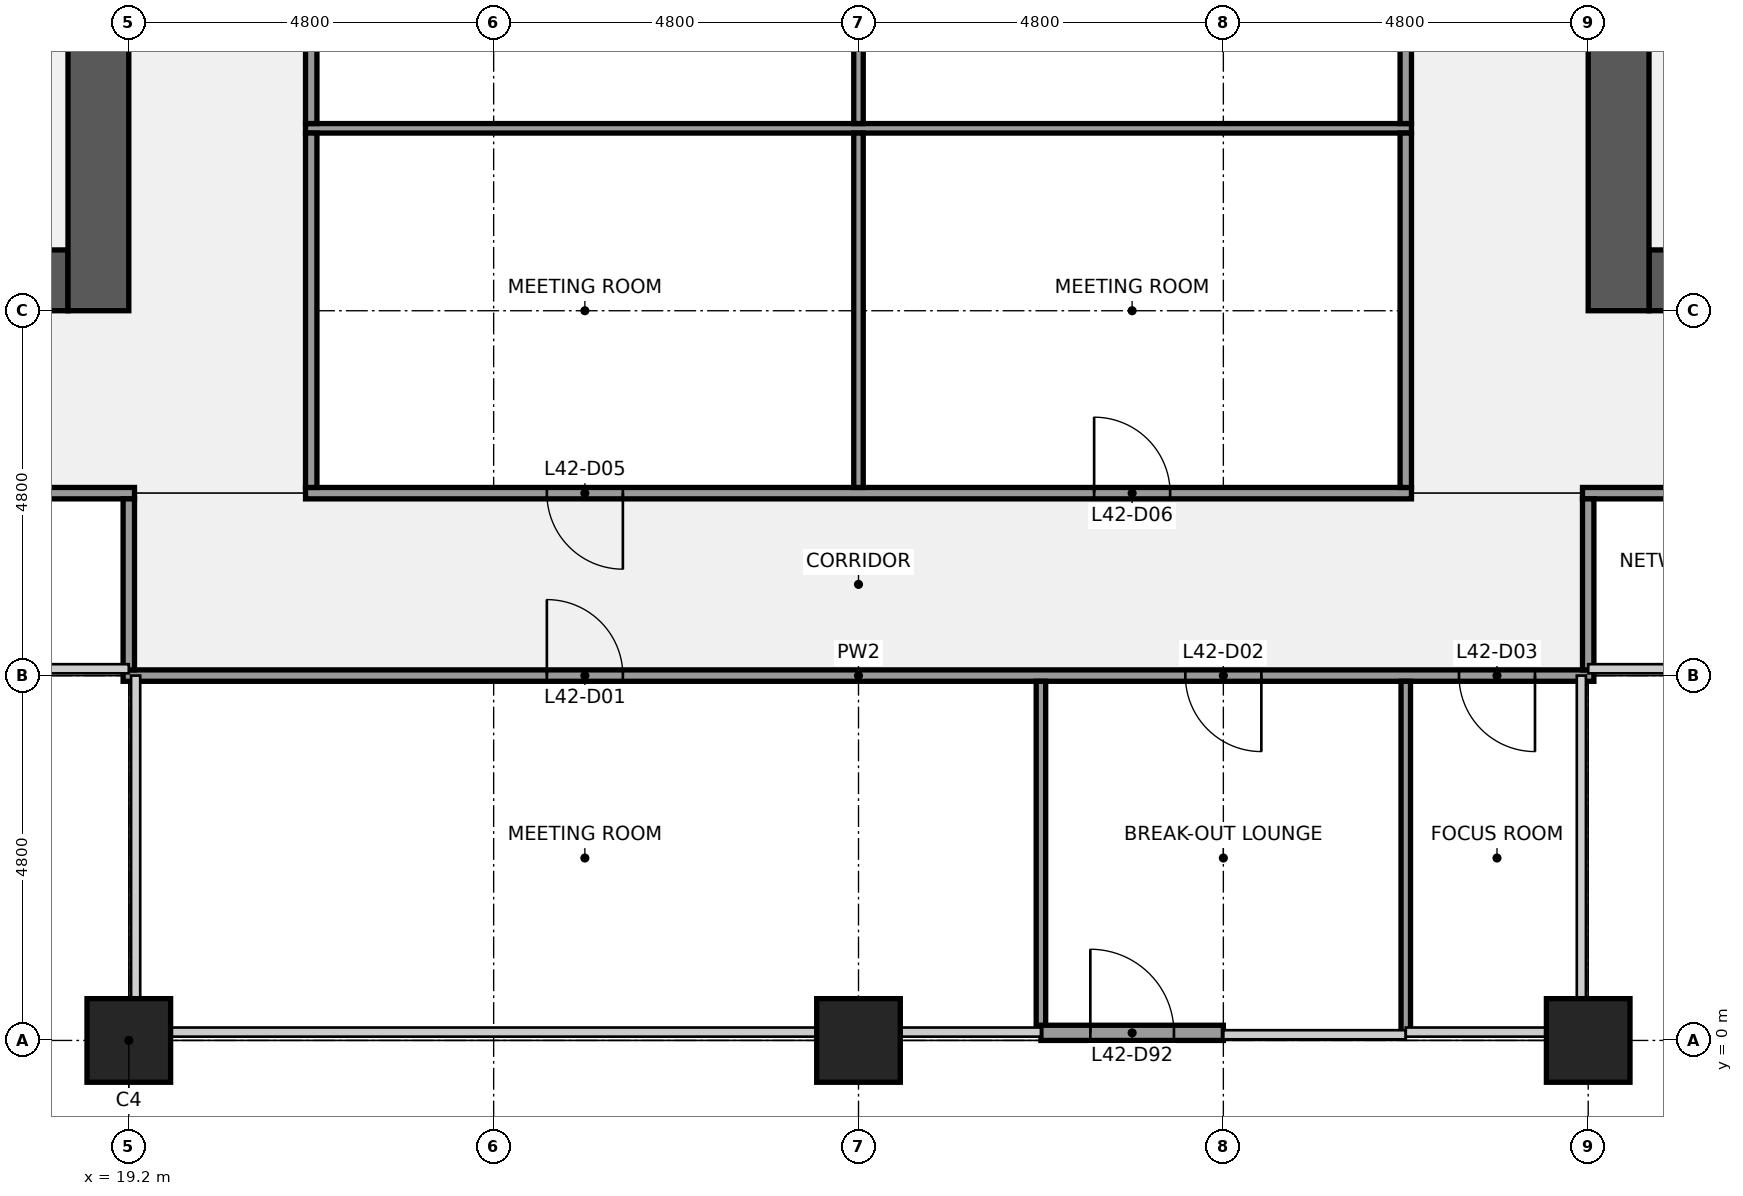
"""IFC4 building model, lengths in metres.
Left out: names, types, materials, properties, quantities, classifications, styles, units other than length and angle.
Written with IfcOpenShell. Run it as: python <this file> out.ifc"""

import sys

from ifc_helpers import new_model, si_unit, direction, frame, frame_2d, origin, origin_2d, place, context, subcontext, project, spatial, rectangle, extrude, element, fill, save


model = new_model("IFC4")
c1 = context("Model", 3, precision=1e-05, world=origin(), true_north=direction((0.0, 1.0)))
c2 = subcontext(c1, "Body", "Model", "MODEL_VIEW")
j1 = project(units=[si_unit("LENGTHUNIT", "METRE"), si_unit("PLANEANGLEUNIT", "RADIAN")], contexts=[c1])
p1 = place(None, origin())
s1 = spatial("IfcSite", under=j1, at=p1, CompositionType="ELEMENT")
p2 = place(p1, origin())
s2 = spatial("IfcBuilding", under=s1, at=p2, CompositionType="ELEMENT")
p3 = place(p2, frame((0.0, 0.0, 197.2)))
s3 = spatial("IfcBuildingStorey", under=s2, at=p3, CompositionType="ELEMENT", Elevation=197.2)
for number, where, z_axis, x_axis in (
    (1, (19.2, 0.0, 0.0), (0.0, 0.0, 1.0), (1.0, 0.0, 0.0)),
    (2, (28.8, 0.0, 0.0), (0.0, 0.0, 1.0), (1.0, 0.0, 0.0)),
    (3, (38.4, 0.0, 0.0), (0.0, 0.0, 1.0), (1.0, 0.0, 0.0)),
):
    element("IfcColumn", number, at=place(p3, frame(where, z_axis=z_axis, x_axis=x_axis)), inside=s3, PredefinedType="COLUMN", context=c2, shape_type="SweptSolid", body=[
        extrude(rectangle(XDim=1.1, YDim=1.1, at=origin_2d()), origin(), (0.0, 0.0, 1.0), 4.0),
    ])
p4 = place(p3, frame((18.4, 10.0, 0.0), z_axis=(0.0, 0.0, 1.0), x_axis=(-1.0, 0.0, 0.0)))
e4 = element("IfcWall", 4, at=p4, inside=s3, PredefinedType="SHEAR", context=c2, shape_type="SweptSolid", body=[
    extrude(rectangle(XDim=8.8, YDim=0.8, at=frame_2d((4.4, 0.0))), origin(), (0.0, 0.0, 1.0), 3.84),
])
p5 = place(p4, frame((1.05, 0.0, 0.0)))
e5 = element("IfcOpeningElement", 5, at=p5, cuts=e4, PredefinedType="OPENING", context=c2, shape_type="SweptSolid", body=[
    extrude(rectangle(XDim=1.1, YDim=2.1, at=frame_2d((0.55, 1.05))), frame((0.0, 0.41, 0.0), z_axis=(0.0, -1.0, 0.0), x_axis=(1.0, 0.0, 0.0)), (0.0, 0.0, 1.0), 0.82),
])
p6 = place(p3, frame((18.8, 38.4, 0.0), z_axis=(0.0, 0.0, 1.0), x_axis=(0.0, -1.0, 0.0)))
e6 = element("IfcWall", 6, at=p6, inside=s3, PredefinedType="SHEAR", context=c2, shape_type="SweptSolid", body=[
    extrude(rectangle(XDim=28.8, YDim=0.8, at=frame_2d((14.4, 0.0))), origin(), (0.0, 0.0, 1.0), 3.84),
])
p7 = place(p6, frame((18.3, 0.0, 0.0)))
e7 = element("IfcOpeningElement", 7, at=p7, cuts=e6, PredefinedType="OPENING", context=c2, shape_type="SweptSolid", body=[
    extrude(rectangle(XDim=1.8, YDim=2.1, at=frame_2d((0.9, 1.05))), frame((0.0, 0.41, 0.0), z_axis=(0.0, -1.0, 0.0), x_axis=(1.0, 0.0, 0.0)), (0.0, 0.0, 1.0), 0.82),
])
p8 = place(p6, frame((8.7, 0.0, 0.0)))
e8 = element("IfcOpeningElement", 8, at=p8, cuts=e6, PredefinedType="OPENING", context=c2, shape_type="SweptSolid", body=[
    extrude(rectangle(XDim=1.8, YDim=2.1, at=frame_2d((0.9, 1.05))), frame((0.0, 0.41, 0.0), z_axis=(0.0, -1.0, 0.0), x_axis=(1.0, 0.0, 0.0)), (0.0, 0.0, 1.0), 0.82),
])
p9 = place(p3, frame((48.0, 10.0, 0.0), z_axis=(0.0, 0.0, 1.0), x_axis=(-1.0, 0.0, 0.0)))
e9 = element("IfcWall", 9, at=p9, inside=s3, PredefinedType="SHEAR", context=c2, shape_type="SweptSolid", body=[
    extrude(rectangle(XDim=8.8, YDim=0.8, at=frame_2d((4.4, 0.0))), origin(), (0.0, 0.0, 1.0), 3.84),
])
p10 = place(p9, frame((6.65, 0.0, 0.0)))
e10 = element("IfcOpeningElement", 10, at=p10, cuts=e9, PredefinedType="OPENING", context=c2, shape_type="SweptSolid", body=[
    extrude(rectangle(XDim=1.1, YDim=2.1, at=frame_2d((0.55, 1.05))), frame((0.0, 0.41, 0.0), z_axis=(0.0, -1.0, 0.0), x_axis=(1.0, 0.0, 0.0)), (0.0, 0.0, 1.0), 0.82),
])
p11 = place(p3, frame((38.8, 9.6, 0.0), z_axis=(0.0, 0.0, 1.0), x_axis=(0.0, 1.0, 0.0)))
e11 = element("IfcWall", 11, at=p11, inside=s3, PredefinedType="SHEAR", context=c2, shape_type="SweptSolid", body=[
    extrude(rectangle(XDim=28.8, YDim=0.8, at=frame_2d((14.4, 0.0))), origin(), (0.0, 0.0, 1.0), 3.84),
])
p12 = place(p11, frame((8.7, 0.0, 0.0)))
e12 = element("IfcOpeningElement", 12, at=p12, cuts=e11, PredefinedType="OPENING", context=c2, shape_type="SweptSolid", body=[
    extrude(rectangle(XDim=1.8, YDim=2.1, at=frame_2d((0.9, 1.05))), frame((0.0, 0.41, 0.0), z_axis=(0.0, -1.0, 0.0), x_axis=(1.0, 0.0, 0.0)), (0.0, 0.0, 1.0), 0.82),
])
p13 = place(p11, frame((18.3, 0.0, 0.0)))
e13 = element("IfcOpeningElement", 13, at=p13, cuts=e11, PredefinedType="OPENING", context=c2, shape_type="SweptSolid", body=[
    extrude(rectangle(XDim=1.8, YDim=2.1, at=frame_2d((0.9, 1.05))), frame((0.0, 0.41, 0.0), z_axis=(0.0, -1.0, 0.0), x_axis=(1.0, 0.0, 0.0)), (0.0, 0.0, 1.0), 0.82),
])
p14 = place(p3, frame((19.125, 4.8, 0.0), z_axis=(0.0, 0.0, 1.0), x_axis=(1.0, 0.0, 0.0)))
e14 = element("IfcWall", 14, at=p14, inside=s3, PredefinedType="PARTITIONING", context=c2, shape_type="SweptSolid", body=[
    extrude(rectangle(XDim=19.35, YDim=0.15, at=frame_2d((9.675, 0.0))), origin(), (0.0, 0.0, 1.0), 2.87),
])
p15 = place(p14, frame((5.575, 0.0, 0.0)))
e15 = element("IfcOpeningElement", 15, at=p15, cuts=e14, PredefinedType="OPENING", context=c2, shape_type="SweptSolid", body=[
    extrude(rectangle(XDim=1.0, YDim=2.1, at=frame_2d((0.5, 1.05))), frame((0.0, 0.085, 0.0), z_axis=(0.0, -1.0, 0.0), x_axis=(1.0, 0.0, 0.0)), (0.0, 0.0, 1.0), 0.17),
])
p16 = place(p14, frame((13.975, 0.0, 0.0)))
e16 = element("IfcOpeningElement", 16, at=p16, cuts=e14, PredefinedType="OPENING", context=c2, shape_type="SweptSolid", body=[
    extrude(rectangle(XDim=1.0, YDim=2.1, at=frame_2d((0.5, 1.05))), frame((0.0, 0.085, 0.0), z_axis=(0.0, -1.0, 0.0), x_axis=(1.0, 0.0, 0.0)), (0.0, 0.0, 1.0), 0.17),
])
p17 = place(p14, frame((17.575, 0.0, 0.0)))
e17 = element("IfcOpeningElement", 17, at=p17, cuts=e14, PredefinedType="OPENING", context=c2, shape_type="SweptSolid", body=[
    extrude(rectangle(XDim=1.0, YDim=2.1, at=frame_2d((0.5, 1.05))), frame((0.0, 0.085, 0.0), z_axis=(0.0, -1.0, 0.0), x_axis=(1.0, 0.0, 0.0)), (0.0, 0.0, 1.0), 0.17),
])
p18 = place(p3, frame((14.325, 7.2, 0.0), z_axis=(0.0, 0.0, 1.0), x_axis=(1.0, 0.0, 0.0)))
e18 = element("IfcWall", 18, at=p18, inside=s3, PredefinedType="PARTITIONING", context=c2, shape_type="SweptSolid", body=[
    extrude(rectangle(XDim=4.95, YDim=0.15, at=frame_2d((2.475, 0.0))), origin(), (0.0, 0.0, 1.0), 2.87),
])
p19 = place(p18, frame((1.975, 0.0, 0.0)))
e19 = element("IfcOpeningElement", 19, at=p19, cuts=e18, PredefinedType="OPENING", context=c2, shape_type="SweptSolid", body=[
    extrude(rectangle(XDim=1.0, YDim=2.1, at=frame_2d((0.5, 1.05))), frame((0.0, 0.085, 0.0), z_axis=(0.0, -1.0, 0.0), x_axis=(1.0, 0.0, 0.0)), (0.0, 0.0, 1.0), 0.17),
])
p20 = place(p3, frame((21.525, 7.2, 0.0), z_axis=(0.0, 0.0, 1.0), x_axis=(1.0, 0.0, 0.0)))
e20 = element("IfcWall", 20, at=p20, inside=s3, PredefinedType="PARTITIONING", context=c2, shape_type="SweptSolid", body=[
    extrude(rectangle(XDim=14.55, YDim=0.15, at=frame_2d((7.275, 0.0))), origin(), (0.0, 0.0, 1.0), 2.87),
])
p21 = place(p20, frame((3.175, 0.0, 0.0)))
e21 = element("IfcOpeningElement", 21, at=p21, cuts=e20, PredefinedType="OPENING", context=c2, shape_type="SweptSolid", body=[
    extrude(rectangle(XDim=1.0, YDim=2.1, at=frame_2d((0.5, 1.05))), frame((0.0, 0.085, 0.0), z_axis=(0.0, -1.0, 0.0), x_axis=(1.0, 0.0, 0.0)), (0.0, 0.0, 1.0), 0.17),
])
p22 = place(p20, frame((10.375, 0.0, 0.0)))
e22 = element("IfcOpeningElement", 22, at=p22, cuts=e20, PredefinedType="OPENING", context=c2, shape_type="SweptSolid", body=[
    extrude(rectangle(XDim=1.0, YDim=2.1, at=frame_2d((0.5, 1.05))), frame((0.0, 0.085, 0.0), z_axis=(0.0, -1.0, 0.0), x_axis=(1.0, 0.0, 0.0)), (0.0, 0.0, 1.0), 0.17),
])
p23 = place(p3, frame((38.325, 7.2, 0.0), z_axis=(0.0, 0.0, 1.0), x_axis=(1.0, 0.0, 0.0)))
e23 = element("IfcWall", 23, at=p23, inside=s3, PredefinedType="PARTITIONING", context=c2, shape_type="SweptSolid", body=[
    extrude(rectangle(XDim=4.95, YDim=0.15, at=frame_2d((2.475, 0.0))), origin(), (0.0, 0.0, 1.0), 2.87),
])
p24 = place(p23, frame((1.975, 0.0, 0.0)))
e24 = element("IfcOpeningElement", 24, at=p24, cuts=e23, PredefinedType="OPENING", context=c2, shape_type="SweptSolid", body=[
    extrude(rectangle(XDim=1.0, YDim=2.1, at=frame_2d((0.5, 1.05))), frame((0.0, 0.085, 0.0), z_axis=(0.0, -1.0, 0.0), x_axis=(1.0, 0.0, 0.0)), (0.0, 0.0, 1.0), 0.17),
])
p25 = place(p3, frame((21.525, 12.0, 0.0), z_axis=(0.0, 0.0, 1.0), x_axis=(1.0, 0.0, 0.0)))
e25 = element("IfcWall", 25, at=p25, inside=s3, PredefinedType="PARTITIONING", context=c2, shape_type="SweptSolid", body=[
    extrude(rectangle(XDim=14.55, YDim=0.125, at=frame_2d((7.275, 0.0))), origin(), (0.0, 0.0, 1.0), 2.87),
])
p26 = place(p3, frame((19.2, 4.875, 0.0), z_axis=(0.0, 0.0, 1.0), x_axis=(0.0, 1.0, 0.0)))
e26 = element("IfcWall", 26, at=p26, inside=s3, PredefinedType="PARTITIONING", context=c2, shape_type="SweptSolid", body=[
    extrude(rectangle(XDim=2.25, YDim=0.15, at=frame_2d((1.125, 0.0))), origin(), (0.0, 0.0, 1.0), 2.87),
])
p27 = place(p3, frame((21.6, 7.275, 0.0), z_axis=(0.0, 0.0, 1.0), x_axis=(0.0, 1.0, 0.0)))
e27 = element("IfcWall", 27, at=p27, inside=s3, PredefinedType="PARTITIONING", context=c2, shape_type="SweptSolid", body=[
    extrude(rectangle(XDim=4.663, YDim=0.15, at=frame_2d((2.331, 0.0))), origin(), (0.0, 0.0, 1.0), 2.87),
])
p28 = place(p3, frame((21.6, 12.062, 0.0), z_axis=(0.0, 0.0, 1.0), x_axis=(0.0, 1.0, 0.0)))
e28 = element("IfcWall", 28, at=p28, inside=s3, PredefinedType="PARTITIONING", context=c2, shape_type="SweptSolid", body=[
    extrude(rectangle(XDim=9.475, YDim=0.15, at=frame_2d((4.738, 0.0))), origin(), (0.0, 0.0, 1.0), 2.87),
])
p29 = place(p28, frame((4.238, 0.0, 0.0)))
e29 = element("IfcOpeningElement", 29, at=p29, cuts=e28, PredefinedType="OPENING", context=c2, shape_type="SweptSolid", body=[
    extrude(rectangle(XDim=1.0, YDim=2.1, at=frame_2d((0.5, 1.05))), frame((0.0, 0.085, 0.0), z_axis=(0.0, -1.0, 0.0), x_axis=(1.0, 0.0, 0.0)), (0.0, 0.0, 1.0), 0.17),
])
p30 = place(p3, frame((28.8, 7.275, 0.0), z_axis=(0.0, 0.0, 1.0), x_axis=(0.0, 1.0, 0.0)))
e30 = element("IfcWall", 30, at=p30, inside=s3, PredefinedType="PARTITIONING", context=c2, shape_type="SweptSolid", body=[
    extrude(rectangle(XDim=4.663, YDim=0.125, at=frame_2d((2.331, 0.0))), origin(), (0.0, 0.0, 1.0), 2.87),
])
p31 = place(p3, frame((28.8, 12.062, 0.0), z_axis=(0.0, 0.0, 1.0), x_axis=(0.0, 1.0, 0.0)))
e31 = element("IfcWall", 31, at=p31, inside=s3, PredefinedType="PARTITIONING", context=c2, shape_type="SweptSolid", body=[
    extrude(rectangle(XDim=9.475, YDim=0.125, at=frame_2d((4.738, 0.0))), origin(), (0.0, 0.0, 1.0), 2.87),
])
for number, where, z_axis, x_axis in (
    (32, (31.2, 0.1, 0.0), (0.0, 0.0, 1.0), (0.0, 1.0, 0.0)),
    (33, (36.0, 0.1, 0.0), (0.0, 0.0, 1.0), (0.0, 1.0, 0.0)),
):
    element("IfcWall", number, at=place(p3, frame(where, z_axis=z_axis, x_axis=x_axis)), inside=s3, PredefinedType="PARTITIONING", context=c2, shape_type="SweptSolid", body=[
        extrude(rectangle(XDim=4.625, YDim=0.125, at=frame_2d((2.312, 0.0))), origin(), (0.0, 0.0, 1.0), 2.87),
    ])
p32 = place(p3, frame((36.0, 7.275, 0.0), z_axis=(0.0, 0.0, 1.0), x_axis=(0.0, 1.0, 0.0)))
e34 = element("IfcWall", 34, at=p32, inside=s3, PredefinedType="PARTITIONING", context=c2, shape_type="SweptSolid", body=[
    extrude(rectangle(XDim=4.663, YDim=0.15, at=frame_2d((2.331, 0.0))), origin(), (0.0, 0.0, 1.0), 2.87),
])
p33 = place(p3, frame((36.0, 12.062, 0.0), z_axis=(0.0, 0.0, 1.0), x_axis=(0.0, 1.0, 0.0)))
e35 = element("IfcWall", 35, at=p33, inside=s3, PredefinedType="PARTITIONING", context=c2, shape_type="SweptSolid", body=[
    extrude(rectangle(XDim=9.475, YDim=0.15, at=frame_2d((4.738, 0.0))), origin(), (0.0, 0.0, 1.0), 2.87),
])
p34 = place(p33, frame((4.238, 0.0, 0.0)))
e36 = element("IfcOpeningElement", 36, at=p34, cuts=e35, PredefinedType="OPENING", context=c2, shape_type="SweptSolid", body=[
    extrude(rectangle(XDim=1.0, YDim=2.1, at=frame_2d((0.5, 1.05))), frame((0.0, 0.085, 0.0), z_axis=(0.0, -1.0, 0.0), x_axis=(1.0, 0.0, 0.0)), (0.0, 0.0, 1.0), 0.17),
])
p35 = place(p3, frame((38.4, 4.875, 0.0), z_axis=(0.0, 0.0, 1.0), x_axis=(0.0, 1.0, 0.0)))
e37 = element("IfcWall", 37, at=p35, inside=s3, PredefinedType="PARTITIONING", context=c2, shape_type="SweptSolid", body=[
    extrude(rectangle(XDim=2.25, YDim=0.15, at=frame_2d((1.125, 0.0))), origin(), (0.0, 0.0, 1.0), 2.87),
])
p36 = place(p3, frame((31.2, 0.1, 0.0), z_axis=(0.0, 0.0, 1.0), x_axis=(1.0, 0.0, 0.0)))
e38 = element("IfcWall", 38, at=p36, inside=s3, PredefinedType="SOLIDWALL", context=c2, shape_type="SweptSolid", body=[
    extrude(rectangle(XDim=2.4, YDim=0.2, at=frame_2d((1.2, 0.0))), origin(), (0.0, 0.0, 1.0), 3.314),
])
p37 = place(p36, frame((0.65, 0.0, 0.0)))
e39 = element("IfcOpeningElement", 39, at=p37, cuts=e38, PredefinedType="OPENING", context=c2, shape_type="SweptSolid", body=[
    extrude(rectangle(XDim=1.1, YDim=2.1, at=frame_2d((0.55, 1.05))), frame((0.0, 0.11, 0.0), z_axis=(0.0, -1.0, 0.0), x_axis=(1.0, 0.0, 0.0)), (0.0, 0.0, 1.0), 0.22),
])
for number, where, z_axis, x_axis in (
    (40, (19.2, -1.025, 0.0), (0.0, 0.0, 1.0), (1.0, 0.0, 0.0)),
    (41, (38.4, -1.025, 0.0), (0.0, 0.0, 1.0), (1.0, 0.0, 0.0)),
):
    element("IfcColumn", number, at=place(p3, frame(where, z_axis=z_axis, x_axis=x_axis)), inside=s3, PredefinedType="PILASTER", context=c2, shape_type="SweptSolid", body=[
        extrude(rectangle(XDim=2.4, YDim=0.95, at=origin_2d()), origin(), (0.0, 0.0, 1.0), 4.0),
    ])
p38 = place(p15, origin())
e42 = element("IfcDoor", 42, at=p38, inside=s3, OperationType="SINGLE_SWING_LEFT", PredefinedType="DOOR", context=c2, shape_type="SweptSolid", body=[
    extrude(rectangle(XDim=1.0, YDim=2.1, at=frame_2d((0.5, 1.05))), frame((0.0, 0.025, 0.0), z_axis=(0.0, -1.0, 0.0), x_axis=(1.0, 0.0, 0.0)), (0.0, 0.0, 1.0), 0.05),
])
fill(e15, e42)
p39 = place(p16, origin())
e43 = element("IfcDoor", 43, at=p39, inside=s3, OperationType="SINGLE_SWING_RIGHT", PredefinedType="DOOR", context=c2, shape_type="SweptSolid", body=[
    extrude(rectangle(XDim=1.0, YDim=2.1, at=frame_2d((0.5, 1.05))), frame((0.0, 0.025, 0.0), z_axis=(0.0, -1.0, 0.0), x_axis=(1.0, 0.0, 0.0)), (0.0, 0.0, 1.0), 0.05),
])
fill(e16, e43)
p40 = place(p17, origin())
e44 = element("IfcDoor", 44, at=p40, inside=s3, OperationType="SINGLE_SWING_RIGHT", PredefinedType="DOOR", context=c2, shape_type="SweptSolid", body=[
    extrude(rectangle(XDim=1.0, YDim=2.1, at=frame_2d((0.5, 1.05))), frame((0.0, 0.025, 0.0), z_axis=(0.0, -1.0, 0.0), x_axis=(1.0, 0.0, 0.0)), (0.0, 0.0, 1.0), 0.05),
])
fill(e17, e44)
p41 = place(p21, origin())
e45 = element("IfcDoor", 45, at=p41, inside=s3, OperationType="SINGLE_SWING_RIGHT", PredefinedType="DOOR", context=c2, shape_type="SweptSolid", body=[
    extrude(rectangle(XDim=1.0, YDim=2.1, at=frame_2d((0.5, 1.05))), frame((0.0, 0.025, 0.0), z_axis=(0.0, -1.0, 0.0), x_axis=(1.0, 0.0, 0.0)), (0.0, 0.0, 1.0), 0.05),
])
fill(e21, e45)
p42 = place(p22, origin())
e46 = element("IfcDoor", 46, at=p42, inside=s3, OperationType="SINGLE_SWING_LEFT", PredefinedType="DOOR", context=c2, shape_type="SweptSolid", body=[
    extrude(rectangle(XDim=1.0, YDim=2.1, at=frame_2d((0.5, 1.05))), frame((0.0, 0.025, 0.0), z_axis=(0.0, -1.0, 0.0), x_axis=(1.0, 0.0, 0.0)), (0.0, 0.0, 1.0), 0.05),
])
fill(e22, e46)
p43 = place(p37, origin())
e47 = element("IfcDoor", 47, at=p43, inside=s3, OperationType="SINGLE_SWING_LEFT", PredefinedType="DOOR", context=c2, shape_type="SweptSolid", body=[
    extrude(rectangle(XDim=1.1, YDim=2.1, at=frame_2d((0.55, 1.05))), frame((0.0, 0.025, 0.0), z_axis=(0.0, -1.0, 0.0), x_axis=(1.0, 0.0, 0.0)), (0.0, 0.0, 1.0), 0.05),
])
fill(e39, e47)
save(model, sys.argv[1])
